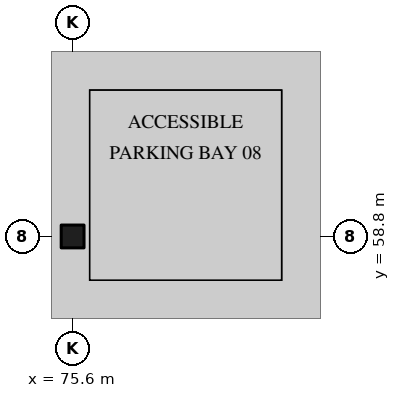
"""IFC4 building model, lengths in metres.
Left out: names, types, materials, properties, quantities, classifications, styles, units other than length and angle.
Written with IfcOpenShell. Run it as: python <this file> out.ifc"""

import sys

from ifc_helpers import new_model, si_unit, direction, frame, origin, origin_2d, place, context, subcontext, project, spatial, rectangle, extrude, element, save


model = new_model("IFC4")
c1 = context("Model", 3, precision=1e-05, world=origin(), true_north=direction((0.0, 1.0)))
c2 = subcontext(c1, "Body", "Model", "MODEL_VIEW")
j1 = project(units=[si_unit("LENGTHUNIT", "METRE"), si_unit("PLANEANGLEUNIT", "RADIAN")], contexts=[c1])
p1 = place(None, origin())
s1 = spatial("IfcSite", under=j1, at=p1, CompositionType="ELEMENT")
p2 = place(p1, origin())
s2 = spatial("IfcBuilding", under=s1, at=p2, CompositionType="ELEMENT")
p3 = place(p2, frame((0.0, 0.0, -4.5)))
s3 = spatial("IfcBuildingStorey", under=s2, at=p3, CompositionType="ELEMENT", Elevation=-4.5)
p4 = place(p3, frame((75.6, 58.8, 0.0), z_axis=(0.0, 0.0, 1.0), x_axis=(1.0, 0.0, 0.0)))
e1 = element("IfcColumn", 1, at=p4, inside=s3, PredefinedType="COLUMN", context=c2, shape_type="SweptSolid", body=[
    extrude(rectangle(XDim=0.6, YDim=0.6, at=origin_2d()), origin(), (0.0, 0.0, 1.0), 4.05),
])
save(model, sys.argv[1])
